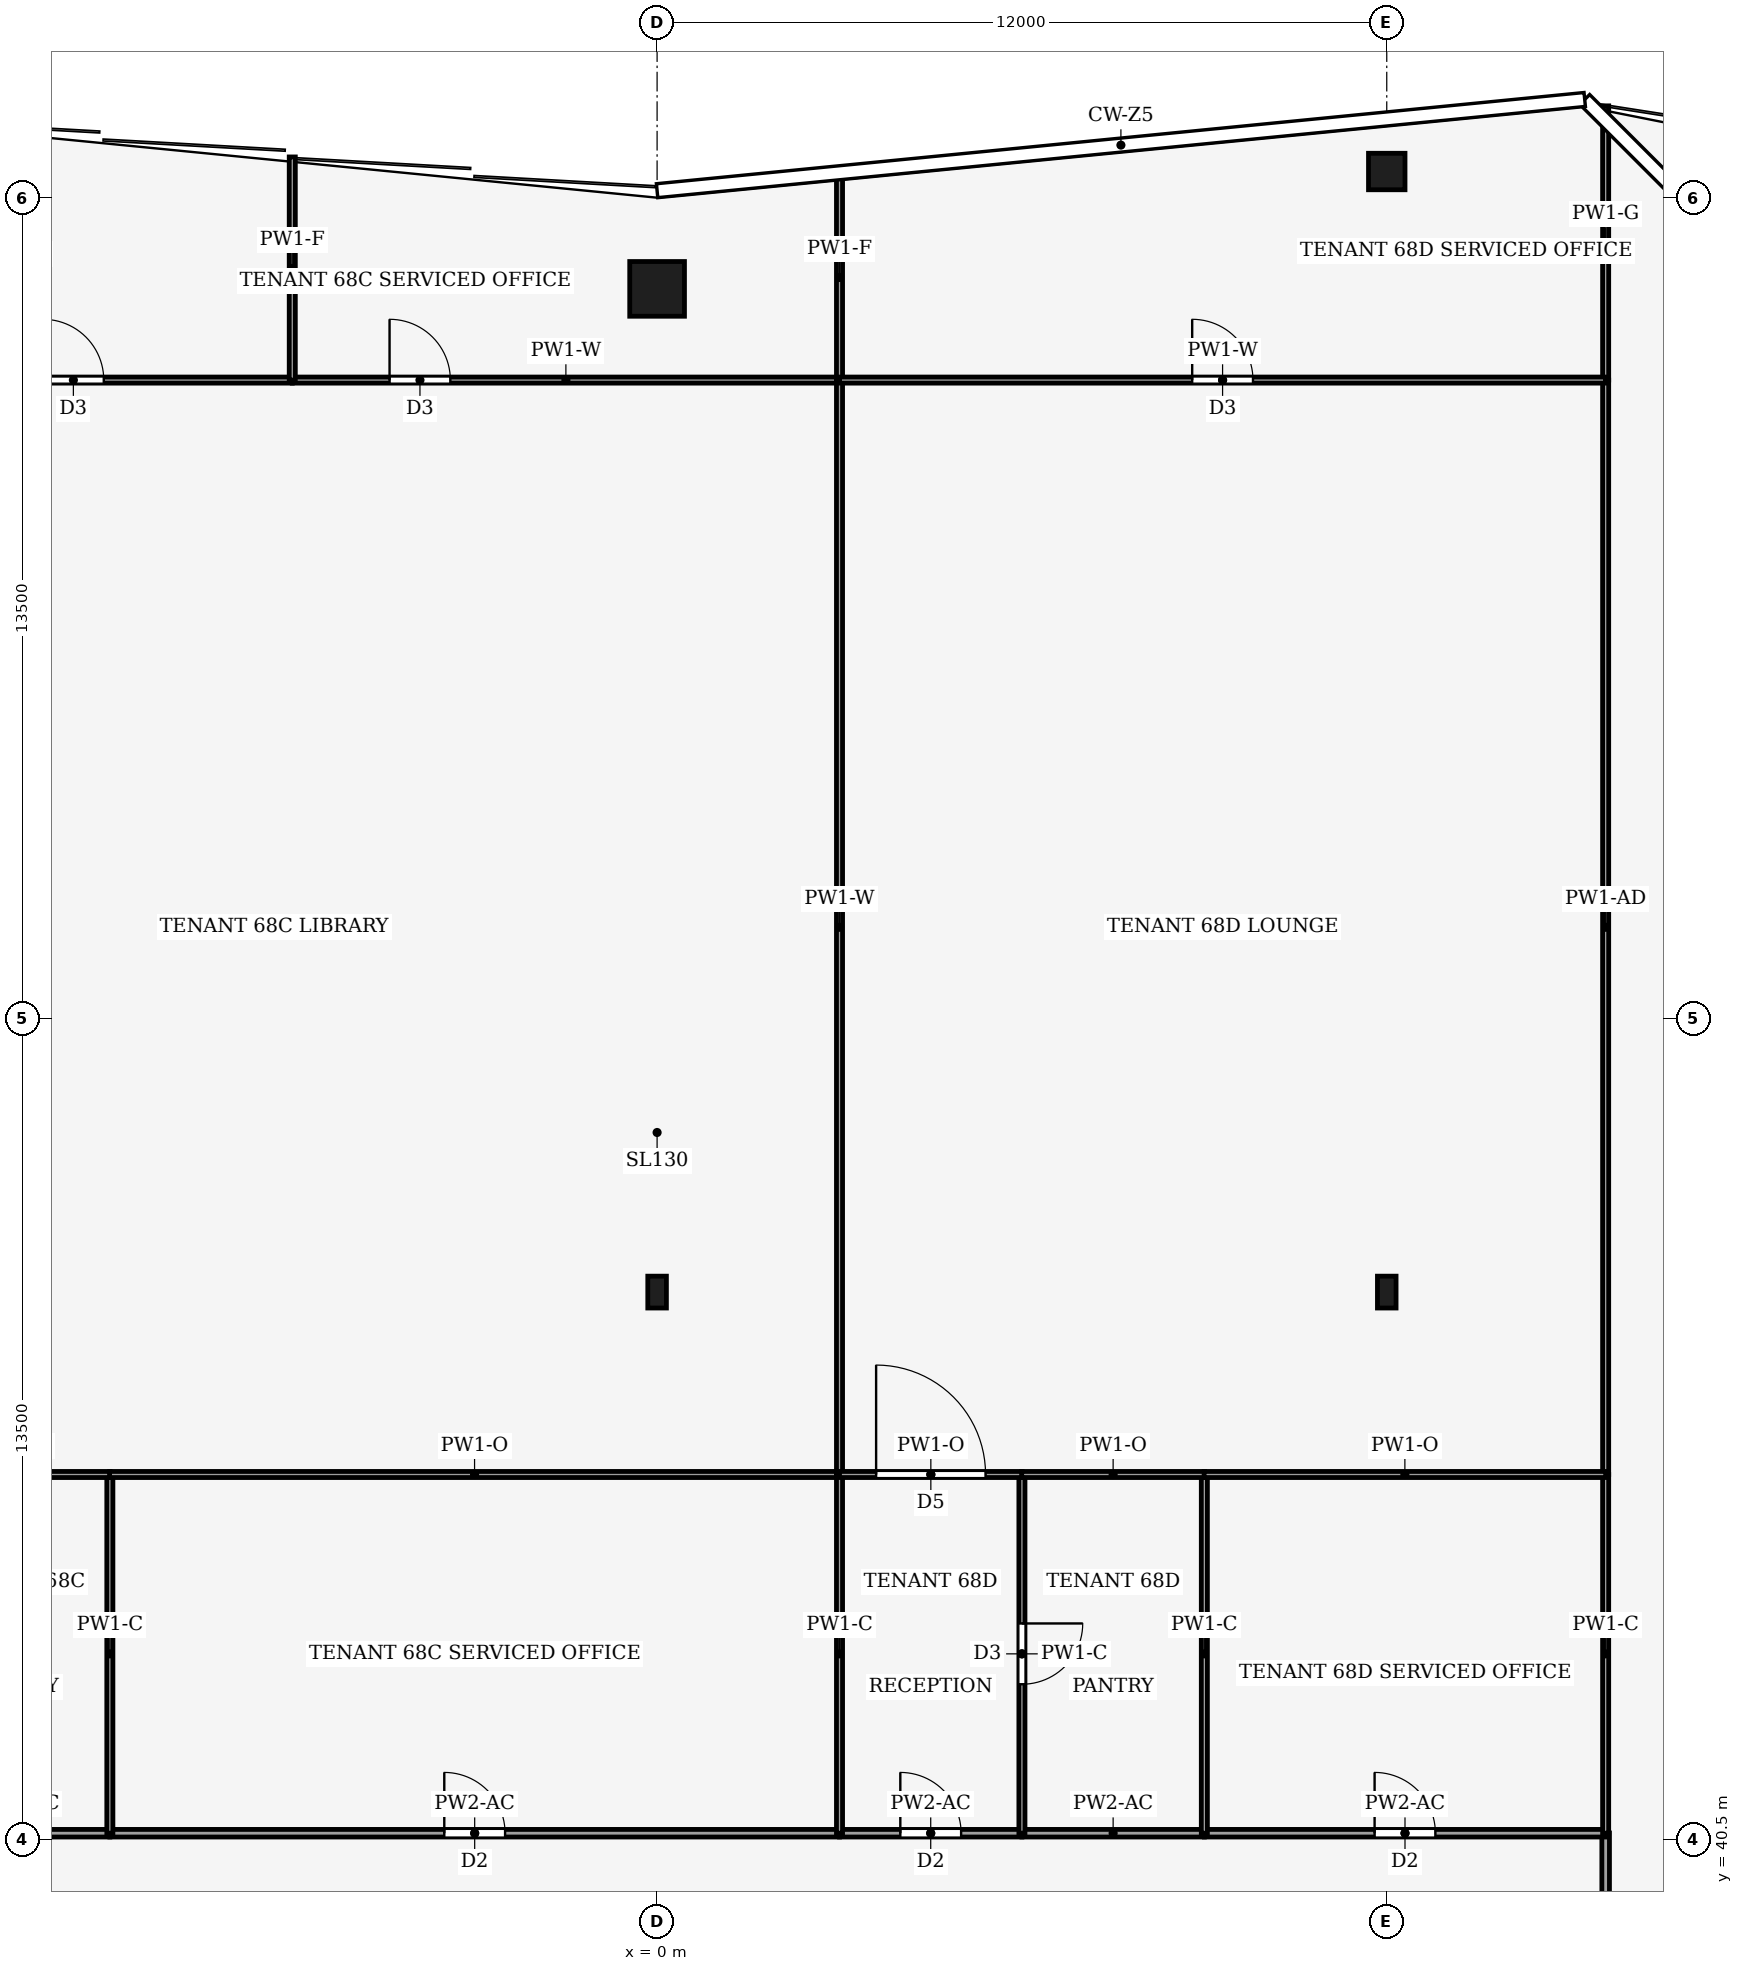
"""IFC4 building model, lengths in metres.
Left out: names, types, materials, properties, quantities, classifications, styles, units other than length and angle.
Written with IfcOpenShell. Run it as: python <this file> out.ifc"""

import sys

from ifc_helpers import new_model, si_unit, direction, frame, frame_2d, origin, origin_2d, place, context, subcontext, project, spatial, rectangle, hollow_rectangle, i_section, extrude, element, fill, save


model = new_model("IFC4")
c1 = context("Model", 3, precision=1e-05, world=origin(), true_north=direction((0.0, 1.0)))
c2 = subcontext(c1, "Body", "Model", "MODEL_VIEW")
j1 = project(units=[si_unit("LENGTHUNIT", "METRE"), si_unit("PLANEANGLEUNIT", "RADIAN")], contexts=[c1])
p1 = place(None, origin())
s1 = spatial("IfcSite", under=j1, at=p1, CompositionType="ELEMENT")
p2 = place(p1, origin())
s2 = spatial("IfcBuilding", under=s1, at=p2, CompositionType="ELEMENT")
p3 = place(p2, frame((0.0, 0.0, 298.0)))
s3 = spatial("IfcBuildingStorey", under=s2, at=p3, CompositionType="ELEMENT", Elevation=298.0)
p4 = place(p3, frame((0.0, 66.0, 0.0), z_axis=(0.0, 0.0, 1.0), x_axis=(1.0, 0.0, 0.0)))
e1 = element("IfcColumn", 1, at=p4, inside=s3, PredefinedType="COLUMN", context=c2, shape_type="SweptSolid", body=[
    extrude(hollow_rectangle(XDim=0.9, YDim=0.9, WallThickness=0.04, at=origin_2d()), origin(), (0.0, 0.0, 1.0), 4.0),
])
p5 = place(p3, frame((12.0, 67.93, 0.0), z_axis=(0.0, 0.0, 1.0), x_axis=(1.0, 0.0, 0.0)))
e2 = element("IfcColumn", 2, at=p5, inside=s3, PredefinedType="COLUMN", context=c2, shape_type="SweptSolid", body=[
    extrude(hollow_rectangle(XDim=0.6, YDim=0.6, WallThickness=0.025, at=origin_2d()), origin(), (0.0, 0.0, 1.0), 4.0),
])
for number, where, z_axis, x_axis in (
    (3, (0.0, 49.5, 0.0), (0.0, 0.0, 1.0), (1.0, 0.0, 0.0)),
    (4, (12.0, 49.5, 0.0), (0.0, 0.0, 1.0), (1.0, 0.0, 0.0)),
):
    element("IfcColumn", number, at=place(p3, frame(where, z_axis=z_axis, x_axis=x_axis)), inside=s3, PredefinedType="COLUMN", context=c2, shape_type="SweptSolid", body=[
        extrude(i_section(OverallWidth=0.306, OverallDepth=0.524, WebThickness=0.012, FlangeThickness=0.04, FilletRadius=0.027, at=origin_2d()), origin(), (0.0, 0.0, 1.0), 4.0),
    ])
p6 = place(p3, frame((15.6, 40.604, 0.0), z_axis=(0.0, 0.0, 1.0), x_axis=(0.0, -1.0, 0.0)))
e5 = element("IfcWall", 5, at=p6, inside=s3, PredefinedType="PARTITIONING", context=c2, shape_type="SweptSolid", body=[
    extrude(rectangle(XDim=6.104, YDim=0.125, at=frame_2d((3.052, 0.0))), origin(), (0.0, 0.0, 1.0), 3.14),
])
p7 = place(p6, frame((2.552, 0.0, 0.0)))
e6 = element("IfcOpeningElement", 6, at=p7, cuts=e5, PredefinedType="OPENING", context=c2, shape_type="SweptSolid", body=[
    extrude(rectangle(XDim=1.0, YDim=2.1, at=frame_2d((0.5, 1.05))), frame((0.0, 0.073, 0.0), z_axis=(0.0, -1.0, 0.0), x_axis=(1.0, 0.0, 0.0)), (0.0, 0.0, 1.0), 0.145),
])
p8 = place(p3, frame((-9.0, 40.6, 0.0), z_axis=(0.0, 0.0, 1.0), x_axis=(-1.0, 0.0, 0.0)))
e7 = element("IfcWall", 7, at=p8, inside=s3, PredefinedType="PARTITIONING", context=c2, shape_type="SweptSolid", body=[
    extrude(rectangle(XDim=3.0, YDim=0.125, at=frame_2d((1.5, 0.0))), origin(), (0.0, 0.0, 1.0), 3.39),
])
p9 = place(p3, frame((-9.0, 40.6, 0.0), z_axis=(0.0, 0.0, 1.0), x_axis=(1.0, 0.0, 0.0)))
e8 = element("IfcWall", 8, at=p9, inside=s3, PredefinedType="PARTITIONING", context=c2, shape_type="SweptSolid", body=[
    extrude(rectangle(XDim=12.0, YDim=0.125, at=frame_2d((6.0, 0.0))), origin(), (0.0, 0.0, 1.0), 3.39),
])
p10 = place(p9, frame((5.5, 0.0, 0.0)))
e9 = element("IfcOpeningElement", 9, at=p10, cuts=e8, PredefinedType="OPENING", context=c2, shape_type="SweptSolid", body=[
    extrude(rectangle(XDim=1.0, YDim=2.1, at=frame_2d((0.5, 1.05))), frame((0.0, 0.073, 0.0), z_axis=(0.0, -1.0, 0.0), x_axis=(1.0, 0.0, 0.0)), (0.0, 0.0, 1.0), 0.145),
])
p11 = place(p3, frame((3.0, 40.6, 0.0), z_axis=(0.0, 0.0, 1.0), x_axis=(1.0, 0.0, 0.0)))
e10 = element("IfcWall", 10, at=p11, inside=s3, PredefinedType="PARTITIONING", context=c2, shape_type="SweptSolid", body=[
    extrude(rectangle(XDim=3.0, YDim=0.125, at=frame_2d((1.5, 0.0))), origin(), (0.0, 0.0, 1.0), 3.39),
])
p12 = place(p11, frame((1.0, 0.0, 0.0)))
e11 = element("IfcOpeningElement", 11, at=p12, cuts=e10, PredefinedType="OPENING", context=c2, shape_type="SweptSolid", body=[
    extrude(rectangle(XDim=1.0, YDim=2.1, at=frame_2d((0.5, 1.05))), frame((0.0, 0.073, 0.0), z_axis=(0.0, -1.0, 0.0), x_axis=(1.0, 0.0, 0.0)), (0.0, 0.0, 1.0), 0.145),
])
p13 = place(p3, frame((9.0, 40.6, 0.0), z_axis=(0.0, 0.0, 1.0), x_axis=(-1.0, 0.0, 0.0)))
e12 = element("IfcWall", 12, at=p13, inside=s3, PredefinedType="PARTITIONING", context=c2, shape_type="SweptSolid", body=[
    extrude(rectangle(XDim=3.0, YDim=0.125, at=frame_2d((1.5, 0.0))), origin(), (0.0, 0.0, 1.0), 3.39),
])
p14 = place(p3, frame((9.0, 40.6, 0.0), z_axis=(0.0, 0.0, 1.0), x_axis=(1.0, 0.0, 0.0)))
e13 = element("IfcWall", 13, at=p14, inside=s3, PredefinedType="PARTITIONING", context=c2, shape_type="SweptSolid", body=[
    extrude(rectangle(XDim=6.6, YDim=0.125, at=frame_2d((3.3, 0.0))), origin(), (0.0, 0.0, 1.0), 3.39),
])
p15 = place(p14, frame((2.8, 0.0, 0.0)))
e14 = element("IfcOpeningElement", 14, at=p15, cuts=e13, PredefinedType="OPENING", context=c2, shape_type="SweptSolid", body=[
    extrude(rectangle(XDim=1.0, YDim=2.1, at=frame_2d((0.5, 1.05))), frame((0.0, 0.073, 0.0), z_axis=(0.0, -1.0, 0.0), x_axis=(1.0, 0.0, 0.0)), (0.0, 0.0, 1.0), 0.145),
])
p16 = place(p3, frame((15.6, 46.5, 0.0), z_axis=(0.0, 0.0, 1.0), x_axis=(0.0, -1.0, 0.0)))
e15 = element("IfcWall", 15, at=p16, inside=s3, PredefinedType="PARTITIONING", context=c2, shape_type="SweptSolid", body=[
    extrude(rectangle(XDim=5.9, YDim=0.1, at=frame_2d((2.95, 0.0))), origin(), (0.0, 0.0, 1.0), 3.87),
])
p17 = place(p3, frame((15.6, 64.5, 0.0), z_axis=(0.0, 0.0, 1.0), x_axis=(0.0, -1.0, 0.0)))
e16 = element("IfcWall", 16, at=p17, inside=s3, PredefinedType="PARTITIONING", context=c2, shape_type="SweptSolid", body=[
    extrude(rectangle(XDim=18.0, YDim=0.1, at=frame_2d((9.0, 0.0))), origin(), (0.0, 0.0, 1.0), 3.35),
])
p18 = place(p3, frame((15.6, 69.01, 0.0), z_axis=(0.0, 0.0, 1.0), x_axis=(0.0, -1.0, 0.0)))
e17 = element("IfcWall", 17, at=p18, inside=s3, PredefinedType="PARTITIONING", context=c2, shape_type="SweptSolid", body=[
    extrude(rectangle(XDim=4.51, YDim=0.1, at=frame_2d((2.255, 0.0))), origin(), (0.0, 0.0, 1.0), 2.93),
])
p19 = place(p3, frame((-9.0, 40.6, 0.0), z_axis=(0.0, 0.0, 1.0), x_axis=(0.0, 1.0, 0.0)))
e18 = element("IfcWall", 18, at=p19, inside=s3, PredefinedType="PARTITIONING", context=c2, shape_type="SweptSolid", body=[
    extrude(rectangle(XDim=5.9, YDim=0.1, at=frame_2d((2.95, 0.0))), origin(), (0.0, 0.0, 1.0), 3.87),
])
p20 = place(p3, frame((-8.996, 46.5, 0.0), z_axis=(0.0, 0.0, 1.0), x_axis=(-1.0, 0.0, 0.0)))
e19 = element("IfcWall", 19, at=p20, inside=s3, PredefinedType="PARTITIONING", context=c2, shape_type="SweptSolid", body=[
    extrude(rectangle(XDim=3.008, YDim=0.1, at=frame_2d((1.504, 0.0))), origin(), (0.0, 0.0, 1.0), 3.87),
])
p21 = place(p3, frame((3.0, 46.5, 0.0), z_axis=(0.0, 0.0, 1.0), x_axis=(-1.0, 0.0, 0.0)))
e20 = element("IfcWall", 20, at=p21, inside=s3, PredefinedType="PARTITIONING", context=c2, shape_type="SweptSolid", body=[
    extrude(rectangle(XDim=12.004, YDim=0.1, at=frame_2d((6.002, 0.0))), origin(), (0.0, 0.0, 1.0), 3.39),
])
p22 = place(p3, frame((3.0, 40.6, 0.0), z_axis=(0.0, 0.0, 1.0), x_axis=(0.0, 1.0, 0.0)))
e21 = element("IfcWall", 21, at=p22, inside=s3, PredefinedType="PARTITIONING", context=c2, shape_type="SweptSolid", body=[
    extrude(rectangle(XDim=5.9, YDim=0.1, at=frame_2d((2.95, 0.0))), origin(), (0.0, 0.0, 1.0), 3.87),
])
p23 = place(p3, frame((-15.6, 64.5, 0.0), z_axis=(0.0, 0.0, 1.0), x_axis=(1.0, 0.0, 0.0)))
e22 = element("IfcWall", 22, at=p23, inside=s3, PredefinedType="PARTITIONING", context=c2, shape_type="SweptSolid", body=[
    extrude(rectangle(XDim=9.6, YDim=0.1, at=frame_2d((4.8, 0.0))), origin(), (0.0, 0.0, 1.0), 3.24),
])
p24 = place(p23, frame((5.5, 0.0, 0.0)))
e23 = element("IfcOpeningElement", 23, at=p24, cuts=e22, PredefinedType="OPENING", context=c2, shape_type="SweptSolid", body=[
    extrude(rectangle(XDim=1.0, YDim=2.1, at=frame_2d((0.5, 1.05))), frame((0.0, 0.06, 0.0), z_axis=(0.0, -1.0, 0.0), x_axis=(1.0, 0.0, 0.0)), (0.0, 0.0, 1.0), 0.12),
])
p25 = place(p3, frame((-6.0, 64.5, 0.0), z_axis=(0.0, 0.0, 1.0), x_axis=(1.0, 0.0, 0.0)))
e24 = element("IfcWall", 24, at=p25, inside=s3, PredefinedType="PARTITIONING", context=c2, shape_type="SweptSolid", body=[
    extrude(rectangle(XDim=9.0, YDim=0.1, at=frame_2d((4.5, 0.0))), origin(), (0.0, 0.0, 1.0), 3.24),
])
p26 = place(p25, frame((1.6, 0.0, 0.0)))
e25 = element("IfcOpeningElement", 25, at=p26, cuts=e24, PredefinedType="OPENING", context=c2, shape_type="SweptSolid", body=[
    extrude(rectangle(XDim=1.0, YDim=2.1, at=frame_2d((0.5, 1.05))), frame((0.0, 0.06, 0.0), z_axis=(0.0, -1.0, 0.0), x_axis=(1.0, 0.0, 0.0)), (0.0, 0.0, 1.0), 0.12),
])
p27 = place(p3, frame((3.0, 46.5, 0.0), z_axis=(0.0, 0.0, 1.0), x_axis=(0.0, 1.0, 0.0)))
e26 = element("IfcWall", 26, at=p27, inside=s3, PredefinedType="PARTITIONING", context=c2, shape_type="SweptSolid", body=[
    extrude(rectangle(XDim=18.0, YDim=0.1, at=frame_2d((9.0, 0.0))), origin(), (0.0, 0.0, 1.0), 3.24),
])
p28 = place(p3, frame((-6.0, 64.5, 0.0), z_axis=(0.0, 0.0, 1.0), x_axis=(0.0, 1.0, 0.0)))
e27 = element("IfcWall", 27, at=p28, inside=s3, PredefinedType="PARTITIONING", context=c2, shape_type="SweptSolid", body=[
    extrude(rectangle(XDim=3.67, YDim=0.1, at=frame_2d((1.835, 0.0))), origin(), (0.0, 0.0, 1.0), 3.04),
])
p29 = place(p3, frame((3.0, 64.5, 0.0), z_axis=(0.0, 0.0, 1.0), x_axis=(0.0, 1.0, 0.0)))
e28 = element("IfcWall", 28, at=p29, inside=s3, PredefinedType="PARTITIONING", context=c2, shape_type="SweptSolid", body=[
    extrude(rectangle(XDim=3.375, YDim=0.1, at=frame_2d((1.688, 0.0))), origin(), (0.0, 0.0, 1.0), 3.04),
])
p30 = place(p3, frame((6.0, 46.5, 0.0), z_axis=(0.0, 0.0, 1.0), x_axis=(0.0, -1.0, 0.0)))
e29 = element("IfcWall", 29, at=p30, inside=s3, PredefinedType="PARTITIONING", context=c2, shape_type="SweptSolid", body=[
    extrude(rectangle(XDim=5.9, YDim=0.1, at=frame_2d((2.95, 0.0))), origin(), (0.0, 0.0, 1.0), 3.87),
])
p31 = place(p30, frame((2.45, 0.0, 0.0)))
e30 = element("IfcOpeningElement", 30, at=p31, cuts=e29, PredefinedType="OPENING", context=c2, shape_type="SweptSolid", body=[
    extrude(rectangle(XDim=1.0, YDim=2.1, at=frame_2d((0.5, 1.05))), frame((0.0, 0.06, 0.0), z_axis=(0.0, -1.0, 0.0), x_axis=(1.0, 0.0, 0.0)), (0.0, 0.0, 1.0), 0.12),
])
p32 = place(p3, frame((3.0, 46.5, 0.0), z_axis=(0.0, 0.0, 1.0), x_axis=(1.0, 0.0, 0.0)))
e31 = element("IfcWall", 31, at=p32, inside=s3, PredefinedType="PARTITIONING", context=c2, shape_type="SweptSolid", body=[
    extrude(rectangle(XDim=3.004, YDim=0.1, at=frame_2d((1.502, 0.0))), origin(), (0.0, 0.0, 1.0), 3.39),
])
p33 = place(p32, frame((0.602, 0.0, 0.0)))
e32 = element("IfcOpeningElement", 32, at=p33, cuts=e31, PredefinedType="OPENING", context=c2, shape_type="SweptSolid", body=[
    extrude(rectangle(XDim=1.8, YDim=2.1, at=frame_2d((0.9, 1.05))), frame((0.0, 0.06, 0.0), z_axis=(0.0, -1.0, 0.0), x_axis=(1.0, 0.0, 0.0)), (0.0, 0.0, 1.0), 0.12),
])
p34 = place(p3, frame((9.0, 40.6, 0.0), z_axis=(0.0, 0.0, 1.0), x_axis=(0.0, 1.0, 0.0)))
e33 = element("IfcWall", 33, at=p34, inside=s3, PredefinedType="PARTITIONING", context=c2, shape_type="SweptSolid", body=[
    extrude(rectangle(XDim=5.9, YDim=0.1, at=frame_2d((2.95, 0.0))), origin(), (0.0, 0.0, 1.0), 3.87),
])
p35 = place(p3, frame((9.004, 46.5, 0.0), z_axis=(0.0, 0.0, 1.0), x_axis=(-1.0, 0.0, 0.0)))
e34 = element("IfcWall", 34, at=p35, inside=s3, PredefinedType="PARTITIONING", context=c2, shape_type="SweptSolid", body=[
    extrude(rectangle(XDim=3.008, YDim=0.1, at=frame_2d((1.504, 0.0))), origin(), (0.0, 0.0, 1.0), 3.39),
])
p36 = place(p3, frame((15.6, 46.5, 0.0), z_axis=(0.0, 0.0, 1.0), x_axis=(-1.0, 0.0, 0.0)))
e35 = element("IfcWall", 35, at=p36, inside=s3, PredefinedType="PARTITIONING", context=c2, shape_type="SweptSolid", body=[
    extrude(rectangle(XDim=6.604, YDim=0.1, at=frame_2d((3.302, 0.0))), origin(), (0.0, 0.0, 1.0), 3.39),
])
p37 = place(p3, frame((3.0, 64.5, 0.0), z_axis=(0.0, 0.0, 1.0), x_axis=(1.0, 0.0, 0.0)))
e36 = element("IfcWall", 36, at=p37, inside=s3, PredefinedType="PARTITIONING", context=c2, shape_type="SweptSolid", body=[
    extrude(rectangle(XDim=12.6, YDim=0.1, at=frame_2d((6.3, 0.0))), origin(), (0.0, 0.0, 1.0), 3.24),
])
p38 = place(p37, frame((5.8, 0.0, 0.0)))
e37 = element("IfcOpeningElement", 37, at=p38, cuts=e36, PredefinedType="OPENING", context=c2, shape_type="SweptSolid", body=[
    extrude(rectangle(XDim=1.0, YDim=2.1, at=frame_2d((0.5, 1.05))), frame((0.0, 0.06, 0.0), z_axis=(0.0, -1.0, 0.0), x_axis=(1.0, 0.0, 0.0)), (0.0, 0.0, 1.0), 0.12),
])
p39 = place(p10, origin())
e38 = element("IfcDoor", 38, at=p39, inside=s3, OperationType="SINGLE_SWING_RIGHT", PredefinedType="DOOR", context=c2, shape_type="SweptSolid", body=[
    extrude(rectangle(XDim=1.0, YDim=2.1, at=frame_2d((0.5, 1.05))), frame((0.0, 0.025, 0.0), z_axis=(0.0, -1.0, 0.0), x_axis=(1.0, 0.0, 0.0)), (0.0, 0.0, 1.0), 0.05),
])
fill(e9, e38)
p40 = place(p12, origin())
e39 = element("IfcDoor", 39, at=p40, inside=s3, OperationType="SINGLE_SWING_LEFT", PredefinedType="DOOR", context=c2, shape_type="SweptSolid", body=[
    extrude(rectangle(XDim=1.0, YDim=2.1, at=frame_2d((0.5, 1.05))), frame((0.0, 0.025, 0.0), z_axis=(0.0, -1.0, 0.0), x_axis=(1.0, 0.0, 0.0)), (0.0, 0.0, 1.0), 0.05),
])
fill(e11, e39)
p41 = place(p15, origin())
e40 = element("IfcDoor", 40, at=p41, inside=s3, OperationType="SINGLE_SWING_RIGHT", PredefinedType="DOOR", context=c2, shape_type="SweptSolid", body=[
    extrude(rectangle(XDim=1.0, YDim=2.1, at=frame_2d((0.5, 1.05))), frame((0.0, 0.025, 0.0), z_axis=(0.0, -1.0, 0.0), x_axis=(1.0, 0.0, 0.0)), (0.0, 0.0, 1.0), 0.05),
])
fill(e14, e40)
p42 = place(p24, origin())
e41 = element("IfcDoor", 41, at=p42, inside=s3, OperationType="SINGLE_SWING_RIGHT", PredefinedType="DOOR", context=c2, shape_type="SweptSolid", body=[
    extrude(rectangle(XDim=1.0, YDim=2.1, at=frame_2d((0.5, 1.05))), frame((0.0, 0.025, 0.0), z_axis=(0.0, -1.0, 0.0), x_axis=(1.0, 0.0, 0.0)), (0.0, 0.0, 1.0), 0.05),
])
fill(e23, e41)
p43 = place(p26, origin())
e42 = element("IfcDoor", 42, at=p43, inside=s3, OperationType="SINGLE_SWING_LEFT", PredefinedType="DOOR", context=c2, shape_type="SweptSolid", body=[
    extrude(rectangle(XDim=1.0, YDim=2.1, at=frame_2d((0.5, 1.05))), frame((0.0, 0.025, 0.0), z_axis=(0.0, -1.0, 0.0), x_axis=(1.0, 0.0, 0.0)), (0.0, 0.0, 1.0), 0.05),
])
fill(e25, e42)
p44 = place(p31, origin())
e43 = element("IfcDoor", 43, at=p44, inside=s3, OperationType="SINGLE_SWING_LEFT", PredefinedType="DOOR", context=c2, shape_type="SweptSolid", body=[
    extrude(rectangle(XDim=1.0, YDim=2.1, at=frame_2d((0.5, 1.05))), frame((0.0, 0.025, 0.0), z_axis=(0.0, -1.0, 0.0), x_axis=(1.0, 0.0, 0.0)), (0.0, 0.0, 1.0), 0.05),
])
fill(e30, e43)
p45 = place(p33, origin())
e44 = element("IfcDoor", 44, at=p45, inside=s3, OperationType="DOUBLE_DOOR_SINGLE_SWING", PredefinedType="DOOR", context=c2, shape_type="SweptSolid", body=[
    extrude(rectangle(XDim=1.8, YDim=2.1, at=frame_2d((0.9, 1.05))), frame((0.0, 0.025, 0.0), z_axis=(0.0, -1.0, 0.0), x_axis=(1.0, 0.0, 0.0)), (0.0, 0.0, 1.0), 0.05),
])
fill(e32, e44)
p46 = place(p38, origin())
e45 = element("IfcDoor", 45, at=p46, inside=s3, OperationType="SINGLE_SWING_LEFT", PredefinedType="DOOR", context=c2, shape_type="SweptSolid", body=[
    extrude(rectangle(XDim=1.0, YDim=2.1, at=frame_2d((0.5, 1.05))), frame((0.0, 0.025, 0.0), z_axis=(0.0, -1.0, 0.0), x_axis=(1.0, 0.0, 0.0)), (0.0, 0.0, 1.0), 0.05),
])
fill(e37, e45)
save(model, sys.argv[1])
